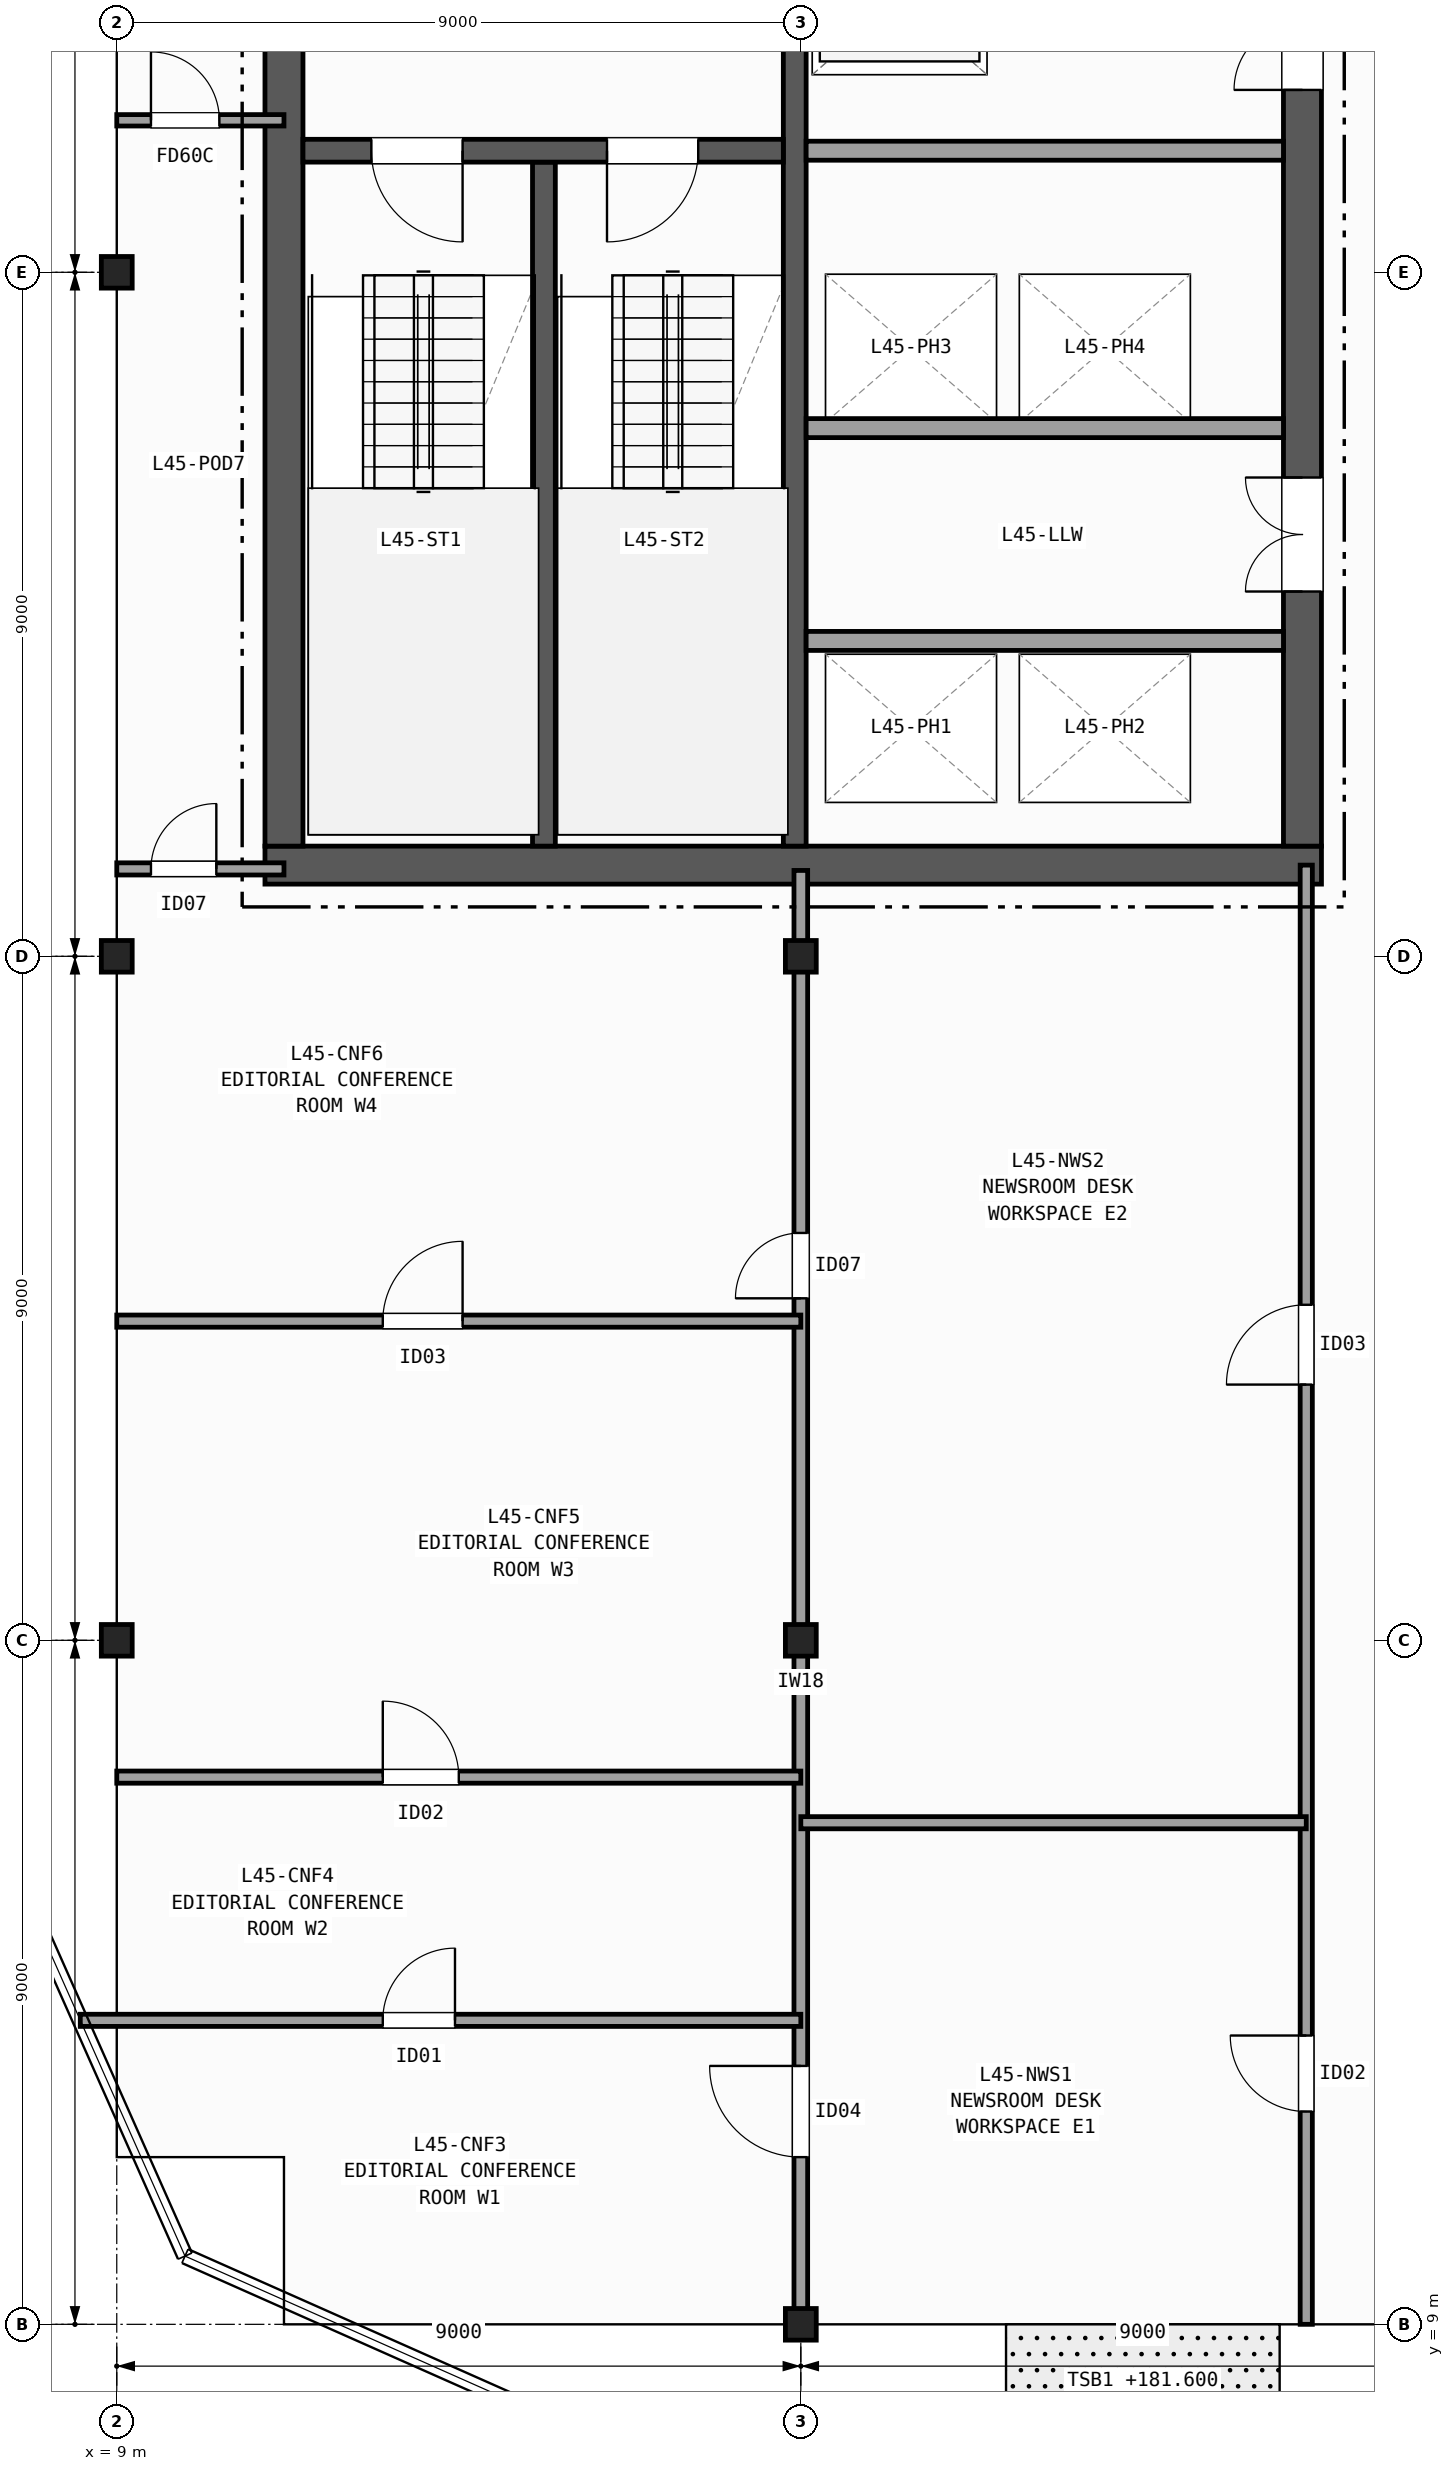
"""IFC4 building model, lengths in metres.
Left out: names, types, materials, properties, quantities, classifications, styles, units other than length and angle.
Written with IfcOpenShell. Run it as: python <this file> out.ifc"""

import sys

from ifc_helpers import new_model, si_unit, direction, frame, frame_2d, origin, origin_2d, place, context, subcontext, project, spatial, rectangle, i_section, extrude, element, fill, save


model = new_model("IFC4")
c1 = context("Model", 3, precision=1e-05, world=origin(), true_north=direction((0.0, 1.0)))
c2 = subcontext(c1, "Body", "Model", "MODEL_VIEW")
j1 = project(units=[si_unit("LENGTHUNIT", "METRE"), si_unit("PLANEANGLEUNIT", "RADIAN")], contexts=[c1])
p1 = place(None, origin())
s1 = spatial("IfcSite", under=j1, at=p1, CompositionType="ELEMENT")
p2 = place(p1, origin())
s2 = spatial("IfcBuilding", under=s1, at=p2, CompositionType="ELEMENT")
p3 = place(p2, frame((0.0, 0.0, 181.6)))
s3 = spatial("IfcBuildingStorey", under=s2, at=p3, CompositionType="ELEMENT", Elevation=181.6)
for number, where, z_axis, x_axis in (
    (1, (9.0, 18.0, 0.0), (0.0, 0.0, 1.0), (1.0, 0.0, 0.0)),
    (2, (9.0, 27.0, 0.0), (0.0, 0.0, 1.0), (1.0, 0.0, 0.0)),
    (3, (9.0, 36.0, 0.0), (0.0, 0.0, 1.0), (1.0, 0.0, 0.0)),
    (4, (18.0, 9.0, 0.0), (0.0, 0.0, 1.0), (1.0, 0.0, 0.0)),
    (5, (18.0, 18.0, 0.0), (0.0, 0.0, 1.0), (1.0, 0.0, 0.0)),
    (6, (18.0, 27.0, 0.0), (0.0, 0.0, 1.0), (1.0, 0.0, 0.0)),
):
    element("IfcColumn", number, at=place(p3, frame(where, z_axis=z_axis, x_axis=x_axis)), inside=s3, PredefinedType="COLUMN", context=c2, shape_type="SweptSolid", body=[
        extrude(i_section(OverallWidth=0.406, OverallDepth=0.416, WebThickness=0.03, FlangeThickness=0.048, FilletRadius=0.015, at=origin_2d()), origin(), (0.0, 0.0, 1.0), 3.7),
    ])
p4 = place(p3, frame((10.95, 28.2, 0.0), z_axis=(0.0, 0.0, 1.0), x_axis=(1.0, 0.0, 0.0)))
e7 = element("IfcWall", 7, at=p4, inside=s3, PredefinedType="SHEAR", context=c2, shape_type="SweptSolid", body=[
    extrude(rectangle(XDim=13.9, YDim=0.5, at=frame_2d((6.95, 0.0))), origin(), (0.0, 0.0, 1.0), 3.42),
])
p5 = place(p3, frame((11.2, 42.15, 0.0), z_axis=(0.0, 0.0, 1.0), x_axis=(0.0, -1.0, 0.0)))
e8 = element("IfcWall", 8, at=p5, inside=s3, PredefinedType="SHEAR", context=c2, shape_type="SweptSolid", body=[
    extrude(rectangle(XDim=13.7, YDim=0.5, at=frame_2d((6.85, 0.0))), origin(), (0.0, 0.0, 1.0), 3.42),
])
p6 = place(p3, frame((24.6, 28.45, 0.0), z_axis=(0.0, 0.0, 1.0), x_axis=(0.0, 1.0, 0.0)))
e9 = element("IfcWall", 9, at=p6, inside=s3, PredefinedType="SHEAR", context=c2, shape_type="SweptSolid", body=[
    extrude(rectangle(XDim=13.7, YDim=0.5, at=frame_2d((6.85, 0.0))), origin(), (0.0, 0.0, 1.0), 3.42),
])
p7 = place(p6, frame((3.35, 0.0, 0.0)))
e10 = element("IfcOpeningElement", 10, at=p7, cuts=e9, PredefinedType="OPENING", context=c2, shape_type="SweptSolid", body=[
    extrude(rectangle(XDim=1.5, YDim=2.2, at=frame_2d((0.75, 1.1))), frame((0.0, 0.26, 0.0), z_axis=(0.0, -1.0, 0.0), x_axis=(1.0, 0.0, 0.0)), (0.0, 0.0, 1.0), 0.52),
])
p8 = place(p6, frame((9.95, 0.0, 0.0)))
e11 = element("IfcOpeningElement", 11, at=p8, cuts=e9, PredefinedType="OPENING", context=c2, shape_type="SweptSolid", body=[
    extrude(rectangle(XDim=0.9, YDim=2.1, at=frame_2d((0.45, 1.05))), frame((0.0, 0.26, 0.0), z_axis=(0.0, -1.0, 0.0), x_axis=(1.0, 0.0, 0.0)), (0.0, 0.0, 1.0), 0.52),
])
p9 = place(p3, frame((14.62, 28.45, 0.0), z_axis=(0.0, 0.0, 1.0), x_axis=(0.0, 1.0, 0.0)))
e12 = element("IfcWall", 12, at=p9, inside=s3, PredefinedType="SHEAR", context=c2, shape_type="SweptSolid", body=[
    extrude(rectangle(XDim=9.0, YDim=0.3, at=frame_2d((4.5, 0.0))), origin(), (0.0, 0.0, 1.0), 3.42),
])
p10 = place(p3, frame((17.92, 42.15, 0.0), z_axis=(0.0, 0.0, 1.0), x_axis=(0.0, -1.0, 0.0)))
e13 = element("IfcWall", 13, at=p10, inside=s3, PredefinedType="SHEAR", context=c2, shape_type="SweptSolid", body=[
    extrude(rectangle(XDim=13.7, YDim=0.3, at=frame_2d((6.85, 0.0))), origin(), (0.0, 0.0, 1.0), 3.42),
])
p11 = place(p10, frame((1.975, 0.0, 0.0)))
e14 = element("IfcOpeningElement", 14, at=p11, cuts=e13, PredefinedType="OPENING", context=c2, shape_type="SweptSolid", body=[
    extrude(rectangle(XDim=1.15, YDim=2.15, at=frame_2d((0.575, 1.075))), frame((0.0, 0.16, 0.0), z_axis=(0.0, -1.0, 0.0), x_axis=(1.0, 0.0, 0.0)), (0.0, 0.0, 1.0), 0.32),
])
p12 = place(p3, frame((17.77, 37.6, 0.0), z_axis=(0.0, 0.0, 1.0), x_axis=(-1.0, 0.0, 0.0)))
e15 = element("IfcWall", 15, at=p12, inside=s3, PredefinedType="SHEAR", context=c2, shape_type="SweptSolid", body=[
    extrude(rectangle(XDim=6.32, YDim=0.3, at=frame_2d((3.16, 0.0))), origin(), (0.0, 0.0, 1.0), 3.42),
])
p13 = place(p12, frame((4.22, 0.0, 0.0)))
e16 = element("IfcOpeningElement", 16, at=p13, cuts=e15, PredefinedType="OPENING", context=c2, shape_type="SweptSolid", body=[
    extrude(rectangle(XDim=1.2, YDim=2.15, at=frame_2d((0.6, 1.075))), frame((0.0, 0.16, 0.0), z_axis=(0.0, -1.0, 0.0), x_axis=(1.0, 0.0, 0.0)), (0.0, 0.0, 1.0), 0.32),
])
p14 = place(p12, frame((1.12, 0.0, 0.0)))
e17 = element("IfcOpeningElement", 17, at=p14, cuts=e15, PredefinedType="OPENING", context=c2, shape_type="SweptSolid", body=[
    extrude(rectangle(XDim=1.2, YDim=2.15, at=frame_2d((0.6, 1.075))), frame((0.0, 0.16, 0.0), z_axis=(0.0, -1.0, 0.0), x_axis=(1.0, 0.0, 0.0)), (0.0, 0.0, 1.0), 0.32),
])
for number, where, z_axis, x_axis in (
    (18, (18.07, 37.6, 0.0), (0.0, 0.0, 1.0), (1.0, 0.0, 0.0)),
    (19, (18.07, 31.15, 0.0), (0.0, 0.0, 1.0), (1.0, 0.0, 0.0)),
    (20, (24.35, 33.95, 0.0), (0.0, 0.0, 1.0), (-1.0, 0.0, 0.0)),
):
    element("IfcWall", number, at=place(p3, frame(where, z_axis=z_axis, x_axis=x_axis)), inside=s3, PredefinedType="PARTITIONING", context=c2, shape_type="SweptSolid", body=[
        extrude(rectangle(XDim=6.28, YDim=0.25, at=frame_2d((3.14, 0.0))), origin(), (0.0, 0.0, 1.0), 3.42),
    ])
p15 = place(p3, frame((9.0, 28.15, 0.0), z_axis=(0.0, 0.0, 1.0), x_axis=(1.0, 0.0, 0.0)))
e21 = element("IfcWall", 21, at=p15, inside=s3, PredefinedType="PARTITIONING", context=c2, shape_type="SweptSolid", body=[
    extrude(rectangle(XDim=2.2, YDim=0.16, at=frame_2d((1.1, 0.0))), origin(), (0.0, 0.0, 1.0), 2.634),
])
p16 = place(p15, frame((0.45, 0.0, 0.0)))
e22 = element("IfcOpeningElement", 22, at=p16, cuts=e21, PredefinedType="OPENING", context=c2, shape_type="SweptSolid", body=[
    extrude(rectangle(XDim=0.86, YDim=2.05, at=frame_2d((0.43, 1.025))), frame((0.0, 0.09, 0.0), z_axis=(0.0, -1.0, 0.0), x_axis=(1.0, 0.0, 0.0)), (0.0, 0.0, 1.0), 0.18),
])
p17 = place(p3, frame((9.0, 38.0, 0.0), z_axis=(0.0, 0.0, 1.0), x_axis=(1.0, 0.0, 0.0)))
e23 = element("IfcWall", 23, at=p17, inside=s3, PredefinedType="PARTITIONING", context=c2, shape_type="SweptSolid", body=[
    extrude(rectangle(XDim=2.2, YDim=0.15, at=frame_2d((1.1, 0.0))), origin(), (0.0, 0.0, 1.0), 3.42),
])
p18 = place(p17, frame((0.45, 0.0, 0.0)))
e24 = element("IfcOpeningElement", 24, at=p18, cuts=e23, PredefinedType="OPENING", context=c2, shape_type="SweptSolid", body=[
    extrude(rectangle(XDim=0.9, YDim=2.1, at=frame_2d((0.45, 1.05))), frame((0.0, 0.085, 0.0), z_axis=(0.0, -1.0, 0.0), x_axis=(1.0, 0.0, 0.0)), (0.0, 0.0, 1.0), 0.17),
])
p19 = place(p3, frame((24.65, 9.0, 0.0), z_axis=(0.0, 0.0, 1.0), x_axis=(0.0, 1.0, 0.0)))
e25 = element("IfcWall", 25, at=p19, inside=s3, PredefinedType="PARTITIONING", context=c2, shape_type="SweptSolid", body=[
    extrude(rectangle(XDim=19.2, YDim=0.16, at=frame_2d((9.6, 0.0))), origin(), (0.0, 0.0, 1.0), 2.634),
])
p20 = place(p19, frame((2.8, 0.0, 0.0)))
e26 = element("IfcOpeningElement", 26, at=p20, cuts=e25, PredefinedType="OPENING", context=c2, shape_type="SweptSolid", body=[
    extrude(rectangle(XDim=1.0, YDim=2.1, at=frame_2d((0.5, 1.05))), frame((0.0, 0.09, 0.0), z_axis=(0.0, -1.0, 0.0), x_axis=(1.0, 0.0, 0.0)), (0.0, 0.0, 1.0), 0.18),
])
p21 = place(p19, frame((12.365, 0.0, 0.0)))
e27 = element("IfcOpeningElement", 27, at=p21, cuts=e25, PredefinedType="OPENING", context=c2, shape_type="SweptSolid", body=[
    extrude(rectangle(XDim=1.05, YDim=2.15, at=frame_2d((0.525, 1.075))), frame((0.0, 0.09, 0.0), z_axis=(0.0, -1.0, 0.0), x_axis=(1.0, 0.0, 0.0)), (0.0, 0.0, 1.0), 0.18),
])
p22 = place(p3, frame((18.0, 9.0, 0.0), z_axis=(0.0, 0.0, 1.0), x_axis=(0.0, 1.0, 0.0)))
e28 = element("IfcWall", 28, at=p22, inside=s3, PredefinedType="PARTITIONING", context=c2, shape_type="SweptSolid", body=[
    extrude(rectangle(XDim=19.13, YDim=0.18, at=frame_2d((9.565, 0.0))), origin(), (0.0, 0.0, 1.0), 2.634),
])
p23 = place(p22, frame((2.2, 0.0, 0.0)))
e29 = element("IfcOpeningElement", 29, at=p23, cuts=e28, PredefinedType="OPENING", context=c2, shape_type="SweptSolid", body=[
    extrude(rectangle(XDim=1.2, YDim=2.15, at=frame_2d((0.6, 1.075))), frame((0.0, 0.1, 0.0), z_axis=(0.0, -1.0, 0.0), x_axis=(1.0, 0.0, 0.0)), (0.0, 0.0, 1.0), 0.2),
])
p24 = place(p22, frame((13.5, 0.0, 0.0)))
e30 = element("IfcOpeningElement", 30, at=p24, cuts=e28, PredefinedType="OPENING", context=c2, shape_type="SweptSolid", body=[
    extrude(rectangle(XDim=0.86, YDim=2.05, at=frame_2d((0.43, 1.025))), frame((0.0, 0.1, 0.0), z_axis=(0.0, -1.0, 0.0), x_axis=(1.0, 0.0, 0.0)), (0.0, 0.0, 1.0), 0.2),
])
p25 = place(p3, frame((18.0, 15.6, 0.0), z_axis=(0.0, 0.0, 1.0), x_axis=(1.0, 0.0, 0.0)))
e31 = element("IfcWall", 31, at=p25, inside=s3, PredefinedType="PARTITIONING", context=c2, shape_type="SweptSolid", body=[
    extrude(rectangle(XDim=6.65, YDim=0.16, at=frame_2d((3.325, 0.0))), origin(), (0.0, 0.0, 1.0), 2.789),
])
p26 = place(p3, frame((8.52, 13.0, 0.0), z_axis=(0.0, 0.0, 1.0), x_axis=(1.0, 0.0, 0.0)))
e32 = element("IfcWall", 32, at=p26, inside=s3, PredefinedType="PARTITIONING", context=c2, shape_type="SweptSolid", body=[
    extrude(rectangle(XDim=9.48, YDim=0.16, at=frame_2d((4.74, 0.0))), origin(), (0.0, 0.0, 1.0), 2.792),
])
p27 = place(p26, frame((3.98, 0.0, 0.0)))
e33 = element("IfcOpeningElement", 33, at=p27, cuts=e32, PredefinedType="OPENING", context=c2, shape_type="SweptSolid", body=[
    extrude(rectangle(XDim=0.95, YDim=2.1, at=frame_2d((0.475, 1.05))), frame((0.0, 0.09, 0.0), z_axis=(0.0, -1.0, 0.0), x_axis=(1.0, 0.0, 0.0)), (0.0, 0.0, 1.0), 0.18),
])
p28 = place(p3, frame((9.0, 16.2, 0.0), z_axis=(0.0, 0.0, 1.0), x_axis=(1.0, 0.0, 0.0)))
e34 = element("IfcWall", 34, at=p28, inside=s3, PredefinedType="PARTITIONING", context=c2, shape_type="SweptSolid", body=[
    extrude(rectangle(XDim=9.0, YDim=0.16, at=frame_2d((4.5, 0.0))), origin(), (0.0, 0.0, 1.0), 2.792),
])
p29 = place(p28, frame((3.5, 0.0, 0.0)))
e35 = element("IfcOpeningElement", 35, at=p29, cuts=e34, PredefinedType="OPENING", context=c2, shape_type="SweptSolid", body=[
    extrude(rectangle(XDim=1.0, YDim=2.1, at=frame_2d((0.5, 1.05))), frame((0.0, 0.09, 0.0), z_axis=(0.0, -1.0, 0.0), x_axis=(1.0, 0.0, 0.0)), (0.0, 0.0, 1.0), 0.18),
])
p30 = place(p3, frame((9.0, 22.2, 0.0), z_axis=(0.0, 0.0, 1.0), x_axis=(1.0, 0.0, 0.0)))
e36 = element("IfcWall", 36, at=p30, inside=s3, PredefinedType="PARTITIONING", context=c2, shape_type="SweptSolid", body=[
    extrude(rectangle(XDim=9.0, YDim=0.16, at=frame_2d((4.5, 0.0))), origin(), (0.0, 0.0, 1.0), 2.634),
])
p31 = place(p30, frame((3.5, 0.0, 0.0)))
e37 = element("IfcOpeningElement", 37, at=p31, cuts=e36, PredefinedType="OPENING", context=c2, shape_type="SweptSolid", body=[
    extrude(rectangle(XDim=1.05, YDim=2.15, at=frame_2d((0.525, 1.075))), frame((0.0, 0.09, 0.0), z_axis=(0.0, -1.0, 0.0), x_axis=(1.0, 0.0, 0.0)), (0.0, 0.0, 1.0), 0.18),
])
p32 = place(p13, origin())
e38 = element("IfcDoor", 38, at=p32, inside=s3, OperationType="SINGLE_SWING_LEFT", PredefinedType="DOOR", context=c2, shape_type="SweptSolid", body=[
    extrude(rectangle(XDim=1.2, YDim=2.15, at=frame_2d((0.6, 1.075))), frame((0.0, 0.025, 0.0), z_axis=(0.0, -1.0, 0.0), x_axis=(1.0, 0.0, 0.0)), (0.0, 0.0, 1.0), 0.05),
])
fill(e16, e38)
p33 = place(p14, origin())
e39 = element("IfcDoor", 39, at=p33, inside=s3, OperationType="SINGLE_SWING_RIGHT", PredefinedType="DOOR", context=c2, shape_type="SweptSolid", body=[
    extrude(rectangle(XDim=1.2, YDim=2.15, at=frame_2d((0.6, 1.075))), frame((0.0, 0.025, 0.0), z_axis=(0.0, -1.0, 0.0), x_axis=(1.0, 0.0, 0.0)), (0.0, 0.0, 1.0), 0.05),
])
fill(e17, e39)
p34 = place(p7, origin())
e40 = element("IfcDoor", 40, at=p34, inside=s3, OperationType="DOUBLE_DOOR_SINGLE_SWING", PredefinedType="DOOR", context=c2, shape_type="SweptSolid", body=[
    extrude(rectangle(XDim=1.5, YDim=2.2, at=frame_2d((0.75, 1.1))), frame((0.0, 0.025, 0.0), z_axis=(0.0, -1.0, 0.0), x_axis=(1.0, 0.0, 0.0)), (0.0, 0.0, 1.0), 0.05),
])
fill(e10, e40)
p35 = place(p8, origin())
e41 = element("IfcDoor", 41, at=p35, inside=s3, OperationType="SINGLE_SWING_LEFT", PredefinedType="DOOR", context=c2, shape_type="SweptSolid", body=[
    extrude(rectangle(XDim=0.9, YDim=2.1, at=frame_2d((0.45, 1.05))), frame((0.0, 0.025, 0.0), z_axis=(0.0, -1.0, 0.0), x_axis=(1.0, 0.0, 0.0)), (0.0, 0.0, 1.0), 0.05),
])
fill(e11, e41)
p36 = place(p16, origin())
e42 = element("IfcDoor", 42, at=p36, inside=s3, OperationType="SINGLE_SWING_RIGHT", PredefinedType="DOOR", context=c2, shape_type="SweptSolid", body=[
    extrude(rectangle(XDim=0.86, YDim=2.05, at=frame_2d((0.43, 1.025))), frame((0.0, 0.025, 0.0), z_axis=(0.0, -1.0, 0.0), x_axis=(1.0, 0.0, 0.0)), (0.0, 0.0, 1.0), 0.05),
])
fill(e22, e42)
p37 = place(p18, origin())
e43 = element("IfcDoor", 43, at=p37, inside=s3, OperationType="SINGLE_SWING_LEFT", PredefinedType="DOOR", context=c2, shape_type="SweptSolid", body=[
    extrude(rectangle(XDim=0.9, YDim=2.1, at=frame_2d((0.45, 1.05))), frame((0.0, 0.025, 0.0), z_axis=(0.0, -1.0, 0.0), x_axis=(1.0, 0.0, 0.0)), (0.0, 0.0, 1.0), 0.05),
])
fill(e24, e43)
p38 = place(p20, origin())
e44 = element("IfcDoor", 44, at=p38, inside=s3, OperationType="SINGLE_SWING_RIGHT", PredefinedType="DOOR", context=c2, shape_type="SweptSolid", body=[
    extrude(rectangle(XDim=1.0, YDim=2.1, at=frame_2d((0.5, 1.05))), frame((0.0, 0.025, 0.0), z_axis=(0.0, -1.0, 0.0), x_axis=(1.0, 0.0, 0.0)), (0.0, 0.0, 1.0), 0.05),
])
fill(e26, e44)
p39 = place(p21, origin())
e45 = element("IfcDoor", 45, at=p39, inside=s3, OperationType="SINGLE_SWING_LEFT", PredefinedType="DOOR", context=c2, shape_type="SweptSolid", body=[
    extrude(rectangle(XDim=1.05, YDim=2.15, at=frame_2d((0.525, 1.075))), frame((0.0, 0.025, 0.0), z_axis=(0.0, -1.0, 0.0), x_axis=(1.0, 0.0, 0.0)), (0.0, 0.0, 1.0), 0.05),
])
fill(e27, e45)
p40 = place(p23, origin())
e46 = element("IfcDoor", 46, at=p40, inside=s3, OperationType="SINGLE_SWING_RIGHT", PredefinedType="DOOR", context=c2, shape_type="SweptSolid", body=[
    extrude(rectangle(XDim=1.2, YDim=2.15, at=frame_2d((0.6, 1.075))), frame((0.0, 0.025, 0.0), z_axis=(0.0, -1.0, 0.0), x_axis=(1.0, 0.0, 0.0)), (0.0, 0.0, 1.0), 0.05),
])
fill(e29, e46)
p41 = place(p24, origin())
e47 = element("IfcDoor", 47, at=p41, inside=s3, OperationType="SINGLE_SWING_LEFT", PredefinedType="DOOR", context=c2, shape_type="SweptSolid", body=[
    extrude(rectangle(XDim=0.86, YDim=2.05, at=frame_2d((0.43, 1.025))), frame((0.0, 0.025, 0.0), z_axis=(0.0, -1.0, 0.0), x_axis=(1.0, 0.0, 0.0)), (0.0, 0.0, 1.0), 0.05),
])
fill(e30, e47)
p42 = place(p27, origin())
e48 = element("IfcDoor", 48, at=p42, inside=s3, OperationType="SINGLE_SWING_RIGHT", PredefinedType="DOOR", context=c2, shape_type="SweptSolid", body=[
    extrude(rectangle(XDim=0.95, YDim=2.1, at=frame_2d((0.475, 1.05))), frame((0.0, 0.025, 0.0), z_axis=(0.0, -1.0, 0.0), x_axis=(1.0, 0.0, 0.0)), (0.0, 0.0, 1.0), 0.05),
])
fill(e33, e48)
p43 = place(p29, origin())
e49 = element("IfcDoor", 49, at=p43, inside=s3, OperationType="SINGLE_SWING_LEFT", PredefinedType="DOOR", context=c2, shape_type="SweptSolid", body=[
    extrude(rectangle(XDim=1.0, YDim=2.1, at=frame_2d((0.5, 1.05))), frame((0.0, 0.025, 0.0), z_axis=(0.0, -1.0, 0.0), x_axis=(1.0, 0.0, 0.0)), (0.0, 0.0, 1.0), 0.05),
])
fill(e35, e49)
p44 = place(p31, origin())
e50 = element("IfcDoor", 50, at=p44, inside=s3, OperationType="SINGLE_SWING_RIGHT", PredefinedType="DOOR", context=c2, shape_type="SweptSolid", body=[
    extrude(rectangle(XDim=1.05, YDim=2.15, at=frame_2d((0.525, 1.075))), frame((0.0, 0.025, 0.0), z_axis=(0.0, -1.0, 0.0), x_axis=(1.0, 0.0, 0.0)), (0.0, 0.0, 1.0), 0.05),
])
fill(e37, e50)
save(model, sys.argv[1])
